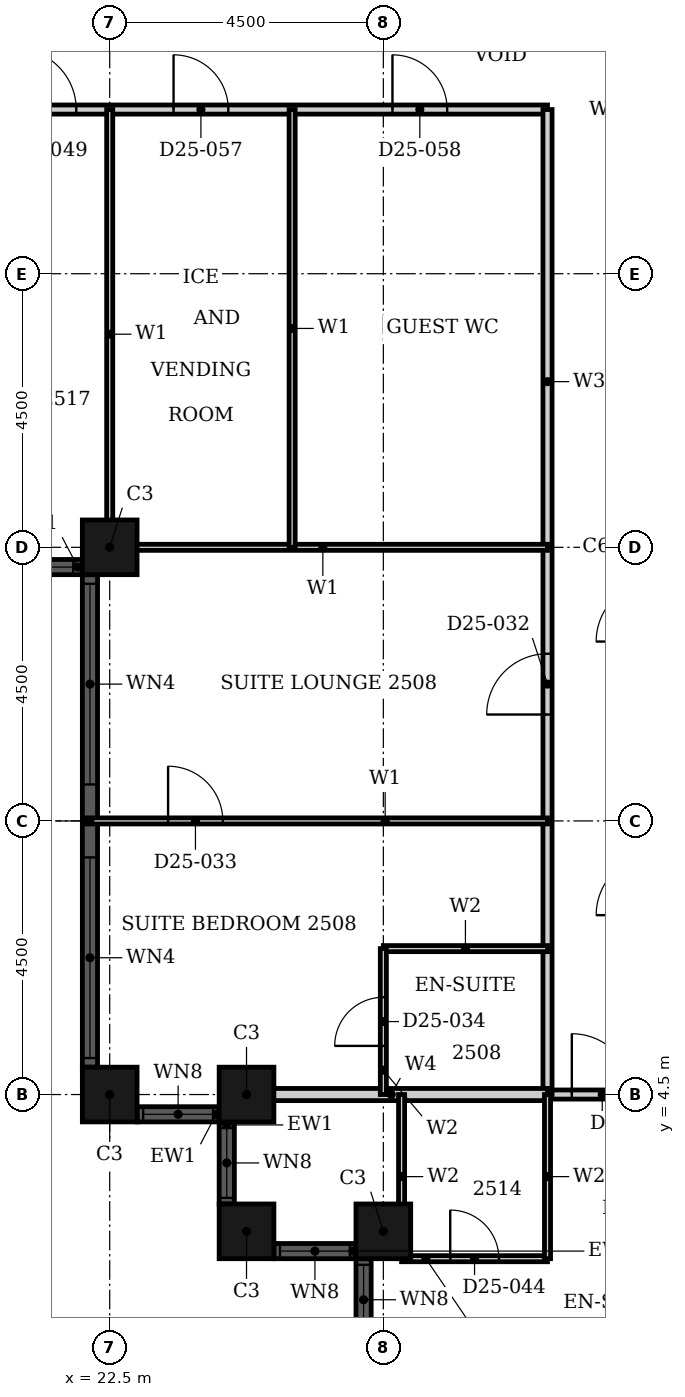
"""IFC4 building model, lengths in metres.
Left out: names, types, materials, properties, quantities, classifications, styles, units other than length and angle.
Written with IfcOpenShell. Run it as: python <this file> out.ifc"""

import sys

from ifc_helpers import new_model, si_unit, direction, frame, frame_2d, origin, origin_2d, place, context, subcontext, project, spatial, rectangle, hollow_rectangle, extrude, element, fill, save


model = new_model("IFC4")
c1 = context("Model", 3, precision=1e-05, world=origin(), true_north=direction((0.0, 1.0)))
c2 = subcontext(c1, "Body", "Model", "MODEL_VIEW")
j1 = project(units=[si_unit("LENGTHUNIT", "METRE"), si_unit("PLANEANGLEUNIT", "RADIAN")], contexts=[c1])
p1 = place(None, origin())
s1 = spatial("IfcSite", under=j1, at=p1, CompositionType="ELEMENT")
p2 = place(p1, origin())
s2 = spatial("IfcBuilding", under=s1, at=p2, CompositionType="ELEMENT")
p3 = place(p2, frame((0.0, 0.0, 104.4)))
s3 = spatial("IfcBuildingStorey", under=s2, at=p3, CompositionType="ELEMENT", Elevation=104.4)
for number, where, z_axis, x_axis in (
    (1, (22.5, 4.5, 0.0), (0.0, 0.0, 1.0), (1.0, 0.0, 0.0)),
    (2, (24.75, 4.5, 0.0), (0.0, 0.0, 1.0), (1.0, 0.0, 0.0)),
    (3, (24.75, 2.25, 0.0), (0.0, 0.0, 1.0), (1.0, 0.0, 0.0)),
    (4, (27.0, 2.25, 0.0), (0.0, 0.0, 1.0), (1.0, 0.0, 0.0)),
    (5, (22.5, 13.5, 0.0), (0.0, 0.0, 1.0), (1.0, 0.0, 0.0)),
):
    element("IfcColumn", number, at=place(p3, frame(where, z_axis=z_axis, x_axis=x_axis)), inside=s3, PredefinedType="COLUMN", context=c2, shape_type="SweptSolid", body=[
        extrude(hollow_rectangle(XDim=0.9, YDim=0.9, WallThickness=0.028, at=origin_2d()), origin(), (0.0, 0.0, 1.0), 3.6),
    ])
p4 = place(p3, frame((22.95, 4.175, 0.0), z_axis=(0.0, 0.0, 1.0), x_axis=(1.0, 0.0, 0.0)))
e6 = element("IfcWall", 6, at=p4, inside=s3, PredefinedType="SOLIDWALL", context=c2, shape_type="SweptSolid", body=[
    extrude(rectangle(XDim=1.35, YDim=0.25, at=frame_2d((0.675, 0.0))), origin(), (0.0, 0.0, 1.0), 3.6),
])
p5 = place(p4, frame((0.1, 0.0, 0.9)))
e7 = element("IfcOpeningElement", 7, at=p5, cuts=e6, PredefinedType="OPENING", context=c2, shape_type="SweptSolid", body=[
    extrude(rectangle(XDim=1.15, YDim=2.08, at=frame_2d((0.575, 1.04))), frame((0.0, 0.135, 0.0), z_axis=(0.0, -1.0, 0.0), x_axis=(1.0, 0.0, 0.0)), (0.0, 0.0, 1.0), 0.27),
])
p6 = place(p3, frame((24.425, 4.05, 0.0), z_axis=(0.0, 0.0, 1.0), x_axis=(0.0, -1.0, 0.0)))
e8 = element("IfcWall", 8, at=p6, inside=s3, PredefinedType="SOLIDWALL", context=c2, shape_type="SweptSolid", body=[
    extrude(rectangle(XDim=1.35, YDim=0.25, at=frame_2d((0.675, 0.0))), origin(), (0.0, 0.0, 1.0), 3.6),
])
p7 = place(p6, frame((0.1, 0.0, 0.9)))
e9 = element("IfcOpeningElement", 9, at=p7, cuts=e8, PredefinedType="OPENING", context=c2, shape_type="SweptSolid", body=[
    extrude(rectangle(XDim=1.15, YDim=2.08, at=frame_2d((0.575, 1.04))), frame((0.0, 0.135, 0.0), z_axis=(0.0, -1.0, 0.0), x_axis=(1.0, 0.0, 0.0)), (0.0, 0.0, 1.0), 0.27),
])
p8 = place(p3, frame((25.2, 1.925, 0.0), z_axis=(0.0, 0.0, 1.0), x_axis=(1.0, 0.0, 0.0)))
e10 = element("IfcWall", 10, at=p8, inside=s3, PredefinedType="SOLIDWALL", context=c2, shape_type="SweptSolid", body=[
    extrude(rectangle(XDim=1.35, YDim=0.25, at=frame_2d((0.675, 0.0))), origin(), (0.0, 0.0, 1.0), 3.6),
])
p9 = place(p8, frame((0.1, 0.0, 0.9)))
e11 = element("IfcOpeningElement", 11, at=p9, cuts=e10, PredefinedType="OPENING", context=c2, shape_type="SweptSolid", body=[
    extrude(rectangle(XDim=1.15, YDim=2.08, at=frame_2d((0.575, 1.04))), frame((0.0, 0.135, 0.0), z_axis=(0.0, -1.0, 0.0), x_axis=(1.0, 0.0, 0.0)), (0.0, 0.0, 1.0), 0.27),
])
p10 = place(p3, frame((26.675, 1.8, 0.0), z_axis=(0.0, 0.0, 1.0), x_axis=(0.0, -1.0, 0.0)))
e12 = element("IfcWall", 12, at=p10, inside=s3, PredefinedType="SOLIDWALL", context=c2, shape_type="SweptSolid", body=[
    extrude(rectangle(XDim=1.35, YDim=0.25, at=frame_2d((0.675, 0.0))), origin(), (0.0, 0.0, 1.0), 3.6),
])
p11 = place(p10, frame((0.1, 0.0, 0.9)))
e13 = element("IfcOpeningElement", 13, at=p11, cuts=e12, PredefinedType="OPENING", context=c2, shape_type="SweptSolid", body=[
    extrude(rectangle(XDim=1.15, YDim=2.08, at=frame_2d((0.575, 1.04))), frame((0.0, 0.135, 0.0), z_axis=(0.0, -1.0, 0.0), x_axis=(1.0, 0.0, 0.0)), (0.0, 0.0, 1.0), 0.27),
])
p12 = place(p3, frame((18.45, 13.175, 0.0), z_axis=(0.0, 0.0, 1.0), x_axis=(1.0, 0.0, 0.0)))
e14 = element("IfcWall", 14, at=p12, inside=s3, PredefinedType="SOLIDWALL", context=c2, shape_type="SweptSolid", body=[
    extrude(rectangle(XDim=3.6, YDim=0.25, at=frame_2d((1.8, 0.0))), origin(), (0.0, 0.0, 1.0), 3.6),
])
p13 = place(p12, frame((0.15, 0.0, 0.9)))
e15 = element("IfcOpeningElement", 15, at=p13, cuts=e14, PredefinedType="OPENING", context=c2, shape_type="SweptSolid", body=[
    extrude(rectangle(XDim=3.3, YDim=2.08, at=frame_2d((1.65, 1.04))), frame((0.0, 0.135, 0.0), z_axis=(0.0, -1.0, 0.0), x_axis=(1.0, 0.0, 0.0)), (0.0, 0.0, 1.0), 0.27),
])
p14 = place(p3, frame((22.175, 13.05, 0.0), z_axis=(0.0, 0.0, 1.0), x_axis=(0.0, -1.0, 0.0)))
e16 = element("IfcWall", 16, at=p14, inside=s3, PredefinedType="SOLIDWALL", context=c2, shape_type="SweptSolid", body=[
    extrude(rectangle(XDim=8.1, YDim=0.25, at=frame_2d((4.05, 0.0))), origin(), (0.0, 0.0, 1.0), 3.6),
])
p15 = place(p14, frame((0.15, 0.0, 0.9)))
e17 = element("IfcOpeningElement", 17, at=p15, cuts=e16, PredefinedType="OPENING", context=c2, shape_type="SweptSolid", body=[
    extrude(rectangle(XDim=3.3, YDim=2.08, at=frame_2d((1.65, 1.04))), frame((0.0, 0.135, 0.0), z_axis=(0.0, -1.0, 0.0), x_axis=(1.0, 0.0, 0.0)), (0.0, 0.0, 1.0), 0.27),
])
p16 = place(p14, frame((4.65, 0.0, 0.9)))
e18 = element("IfcOpeningElement", 18, at=p16, cuts=e16, PredefinedType="OPENING", context=c2, shape_type="SweptSolid", body=[
    extrude(rectangle(XDim=3.3, YDim=2.08, at=frame_2d((1.65, 1.04))), frame((0.0, 0.135, 0.0), z_axis=(0.0, -1.0, 0.0), x_axis=(1.0, 0.0, 0.0)), (0.0, 0.0, 1.0), 0.27),
])
p17 = place(p3, frame((16.2, 20.7, 0.0), z_axis=(0.0, 0.0, 1.0), x_axis=(1.0, 0.0, 0.0)))
e19 = element("IfcWall", 19, at=p17, inside=s3, PredefinedType="PARTITIONING", context=c2, shape_type="SweptSolid", body=[
    extrude(rectangle(XDim=13.5, YDim=0.15, at=frame_2d((6.75, 0.0))), origin(), (0.0, 0.0, 1.0), 3.3),
])
p18 = place(p17, frame((4.75, 0.0, 0.0)))
e20 = element("IfcOpeningElement", 20, at=p18, cuts=e19, PredefinedType="OPENING", context=c2, shape_type="SweptSolid", body=[
    extrude(rectangle(XDim=1.0, YDim=2.1, at=frame_2d((0.5, 1.05))), frame((0.0, 0.085, 0.0), z_axis=(0.0, -1.0, 0.0), x_axis=(1.0, 0.0, 0.0)), (0.0, 0.0, 1.0), 0.17),
])
p19 = place(p17, frame((7.35, 0.0, 0.0)))
e21 = element("IfcOpeningElement", 21, at=p19, cuts=e19, PredefinedType="OPENING", context=c2, shape_type="SweptSolid", body=[
    extrude(rectangle(XDim=0.9, YDim=2.1, at=frame_2d((0.45, 1.05))), frame((0.0, 0.085, 0.0), z_axis=(0.0, -1.0, 0.0), x_axis=(1.0, 0.0, 0.0)), (0.0, 0.0, 1.0), 0.17),
])
p20 = place(p17, frame((10.95, 0.0, 0.0)))
e22 = element("IfcOpeningElement", 22, at=p20, cuts=e19, PredefinedType="OPENING", context=c2, shape_type="SweptSolid", body=[
    extrude(rectangle(XDim=0.9, YDim=2.1, at=frame_2d((0.45, 1.05))), frame((0.0, 0.085, 0.0), z_axis=(0.0, -1.0, 0.0), x_axis=(1.0, 0.0, 0.0)), (0.0, 0.0, 1.0), 0.17),
])
p21 = place(p3, frame((29.7, 4.5, 0.0), z_axis=(0.0, 0.0, 1.0), x_axis=(1.0, 0.0, 0.0)))
e23 = element("IfcWall", 23, at=p21, inside=s3, PredefinedType="PARTITIONING", context=c2, shape_type="SweptSolid", body=[
    extrude(rectangle(XDim=1.8, YDim=0.15, at=frame_2d((0.9, 0.0))), origin(), (0.0, 0.0, 1.0), 3.3),
])
p22 = place(p21, frame((0.4, 0.0, 0.0)))
e24 = element("IfcOpeningElement", 24, at=p22, cuts=e23, PredefinedType="OPENING", context=c2, shape_type="SweptSolid", body=[
    extrude(rectangle(XDim=1.0, YDim=2.1, at=frame_2d((0.5, 1.05))), frame((0.0, 0.085, 0.0), z_axis=(0.0, -1.0, 0.0), x_axis=(1.0, 0.0, 0.0)), (0.0, 0.0, 1.0), 0.17),
])
p23 = place(p3, frame((29.7, 4.5, 0.0), z_axis=(0.0, 0.0, 1.0), x_axis=(0.0, 1.0, 0.0)))
e25 = element("IfcWall", 25, at=p23, inside=s3, PredefinedType="PARTITIONING", context=c2, shape_type="SweptSolid", body=[
    extrude(rectangle(XDim=16.2, YDim=0.15, at=frame_2d((8.1, 0.0))), origin(), (0.0, 0.0, 1.0), 3.3),
])
p24 = place(p23, frame((6.25, 0.0, 0.0)))
e26 = element("IfcOpeningElement", 26, at=p24, cuts=e25, PredefinedType="OPENING", context=c2, shape_type="SweptSolid", body=[
    extrude(rectangle(XDim=1.0, YDim=2.1, at=frame_2d((0.5, 1.05))), frame((0.0, 0.085, 0.0), z_axis=(0.0, -1.0, 0.0), x_axis=(1.0, 0.0, 0.0)), (0.0, 0.0, 1.0), 0.17),
])
p25 = place(p3, frame((22.31, 13.5, 0.0), z_axis=(0.0, 0.0, 1.0), x_axis=(1.0, 0.0, 0.0)))
e27 = element("IfcWall", 27, at=p25, inside=s3, PredefinedType="PARTITIONING", context=c2, shape_type="SweptSolid", body=[
    extrude(rectangle(XDim=7.39, YDim=0.1, at=frame_2d((3.695, 0.0))), origin(), (0.0, 0.0, 1.0), 2.38),
])
p26 = place(p3, frame((22.11, 9.0, 0.0), z_axis=(0.0, 0.0, 1.0), x_axis=(1.0, 0.0, 0.0)))
e28 = element("IfcWall", 28, at=p26, inside=s3, PredefinedType="PARTITIONING", context=c2, shape_type="SweptSolid", body=[
    extrude(rectangle(XDim=7.59, YDim=0.1, at=frame_2d((3.795, 0.0))), origin(), (0.0, 0.0, 1.0), 3.3),
])
p27 = place(p26, frame((1.35, 0.0, 0.0)))
e29 = element("IfcOpeningElement", 29, at=p27, cuts=e28, PredefinedType="OPENING", context=c2, shape_type="SweptSolid", body=[
    extrude(rectangle(XDim=0.9, YDim=2.1, at=frame_2d((0.45, 1.05))), frame((0.0, 0.06, 0.0), z_axis=(0.0, -1.0, 0.0), x_axis=(1.0, 0.0, 0.0)), (0.0, 0.0, 1.0), 0.12),
])
p28 = place(p3, frame((22.5, 13.31, 0.0), z_axis=(0.0, 0.0, 1.0), x_axis=(0.0, 1.0, 0.0)))
e30 = element("IfcWall", 30, at=p28, inside=s3, PredefinedType="PARTITIONING", context=c2, shape_type="SweptSolid", body=[
    extrude(rectangle(XDim=7.39, YDim=0.1, at=frame_2d((3.695, 0.0))), origin(), (0.0, 0.0, 1.0), 3.3),
])
p29 = place(p3, frame((25.5, 13.5, 0.0), z_axis=(0.0, 0.0, 1.0), x_axis=(0.0, 1.0, 0.0)))
e31 = element("IfcWall", 31, at=p29, inside=s3, PredefinedType="PARTITIONING", context=c2, shape_type="SweptSolid", body=[
    extrude(rectangle(XDim=7.2, YDim=0.1, at=frame_2d((3.6, 0.0))), origin(), (0.0, 0.0, 1.0), 3.3),
])
p30 = place(p3, frame((24.56, 4.5, 0.0), z_axis=(0.0, 0.0, 1.0), x_axis=(1.0, 0.0, 0.0)))
e32 = element("IfcWall", 32, at=p30, inside=s3, PredefinedType="PARTITIONING", context=c2, shape_type="SweptSolid", body=[
    extrude(rectangle(XDim=5.14, YDim=0.2, at=frame_2d((2.57, 0.0))), origin(), (0.0, 0.0, 1.0), 3.3),
])
p31 = place(p3, frame((27.3, 1.8, 0.0), z_axis=(0.0, 0.0, 1.0), x_axis=(1.0, 0.0, 0.0)))
e33 = element("IfcWall", 33, at=p31, inside=s3, PredefinedType="PARTITIONING", context=c2, shape_type="SweptSolid", body=[
    extrude(rectangle(XDim=2.4, YDim=0.1, at=frame_2d((1.2, 0.0))), origin(), (0.0, 0.0, 1.0), 3.3),
])
p32 = place(p31, frame((0.8, 0.0, 0.0)))
e34 = element("IfcOpeningElement", 34, at=p32, cuts=e33, PredefinedType="OPENING", context=c2, shape_type="SweptSolid", body=[
    extrude(rectangle(XDim=0.8, YDim=2.1, at=frame_2d((0.4, 1.05))), frame((0.0, 0.06, 0.0), z_axis=(0.0, -1.0, 0.0), x_axis=(1.0, 0.0, 0.0)), (0.0, 0.0, 1.0), 0.12),
])
p33 = place(p3, frame((27.0, 6.9, 0.0), z_axis=(0.0, 0.0, 1.0), x_axis=(1.0, 0.0, 0.0)))
e35 = element("IfcWall", 35, at=p33, inside=s3, PredefinedType="PARTITIONING", context=c2, shape_type="SweptSolid", body=[
    extrude(rectangle(XDim=2.7, YDim=0.1, at=frame_2d((1.35, 0.0))), origin(), (0.0, 0.0, 1.0), 3.3),
])
p34 = place(p3, frame((27.0, 4.5, 0.0), z_axis=(0.0, 0.0, 1.0), x_axis=(0.0, 1.0, 0.0)))
e36 = element("IfcWall", 36, at=p34, inside=s3, PredefinedType="PARTITIONING", context=c2, shape_type="SweptSolid", body=[
    extrude(rectangle(XDim=2.4, YDim=0.1, at=frame_2d((1.2, 0.0))), origin(), (0.0, 0.0, 1.0), 2.58),
])
p35 = place(p34, frame((0.8, 0.0, 0.0)))
e37 = element("IfcOpeningElement", 37, at=p35, cuts=e36, PredefinedType="OPENING", context=c2, shape_type="SweptSolid", body=[
    extrude(rectangle(XDim=0.8, YDim=2.1, at=frame_2d((0.4, 1.05))), frame((0.0, 0.06, 0.0), z_axis=(0.0, -1.0, 0.0), x_axis=(1.0, 0.0, 0.0)), (0.0, 0.0, 1.0), 0.12),
])
for number, where, z_axis, x_axis in (
    (38, (27.3, 1.8, 0.0), (0.0, 0.0, 1.0), (0.0, 1.0, 0.0)),
    (39, (29.7, 1.8, 0.0), (0.0, 0.0, 1.0), (0.0, 1.0, 0.0)),
):
    element("IfcWall", number, at=place(p3, frame(where, z_axis=z_axis, x_axis=x_axis)), inside=s3, PredefinedType="PARTITIONING", context=c2, shape_type="SweptSolid", body=[
        extrude(rectangle(XDim=2.7, YDim=0.1, at=frame_2d((1.35, 0.0))), origin(), (0.0, 0.0, 1.0), 3.3),
    ])
p36 = place(p5, origin())
e40 = element("IfcWindow", 40, at=p36, inside=s3, PartitioningType="SINGLE_PANEL", PredefinedType="WINDOW", context=c2, shape_type="SweptSolid", body=[
    extrude(rectangle(XDim=1.15, YDim=2.08, at=frame_2d((0.575, 1.04))), frame((0.0, 0.03, 0.0), z_axis=(0.0, -1.0, 0.0), x_axis=(1.0, 0.0, 0.0)), (0.0, 0.0, 1.0), 0.06),
])
fill(e7, e40)
p37 = place(p7, origin())
e41 = element("IfcWindow", 41, at=p37, inside=s3, PartitioningType="SINGLE_PANEL", PredefinedType="WINDOW", context=c2, shape_type="SweptSolid", body=[
    extrude(rectangle(XDim=1.15, YDim=2.08, at=frame_2d((0.575, 1.04))), frame((0.0, 0.03, 0.0), z_axis=(0.0, -1.0, 0.0), x_axis=(1.0, 0.0, 0.0)), (0.0, 0.0, 1.0), 0.06),
])
fill(e9, e41)
p38 = place(p9, origin())
e42 = element("IfcWindow", 42, at=p38, inside=s3, PartitioningType="SINGLE_PANEL", PredefinedType="WINDOW", context=c2, shape_type="SweptSolid", body=[
    extrude(rectangle(XDim=1.15, YDim=2.08, at=frame_2d((0.575, 1.04))), frame((0.0, 0.03, 0.0), z_axis=(0.0, -1.0, 0.0), x_axis=(1.0, 0.0, 0.0)), (0.0, 0.0, 1.0), 0.06),
])
fill(e11, e42)
p39 = place(p11, origin())
e43 = element("IfcWindow", 43, at=p39, inside=s3, PartitioningType="SINGLE_PANEL", PredefinedType="WINDOW", context=c2, shape_type="SweptSolid", body=[
    extrude(rectangle(XDim=1.15, YDim=2.08, at=frame_2d((0.575, 1.04))), frame((0.0, 0.03, 0.0), z_axis=(0.0, -1.0, 0.0), x_axis=(1.0, 0.0, 0.0)), (0.0, 0.0, 1.0), 0.06),
])
fill(e13, e43)
p40 = place(p13, origin())
e44 = element("IfcWindow", 44, at=p40, inside=s3, PartitioningType="SINGLE_PANEL", PredefinedType="WINDOW", context=c2, shape_type="SweptSolid", body=[
    extrude(rectangle(XDim=3.3, YDim=2.08, at=frame_2d((1.65, 1.04))), frame((0.0, 0.03, 0.0), z_axis=(0.0, -1.0, 0.0), x_axis=(1.0, 0.0, 0.0)), (0.0, 0.0, 1.0), 0.06),
])
fill(e15, e44)
p41 = place(p15, origin())
e45 = element("IfcWindow", 45, at=p41, inside=s3, PartitioningType="SINGLE_PANEL", PredefinedType="WINDOW", context=c2, shape_type="SweptSolid", body=[
    extrude(rectangle(XDim=3.3, YDim=2.08, at=frame_2d((1.65, 1.04))), frame((0.0, 0.03, 0.0), z_axis=(0.0, -1.0, 0.0), x_axis=(1.0, 0.0, 0.0)), (0.0, 0.0, 1.0), 0.06),
])
fill(e17, e45)
p42 = place(p16, origin())
e46 = element("IfcWindow", 46, at=p42, inside=s3, PartitioningType="SINGLE_PANEL", PredefinedType="WINDOW", context=c2, shape_type="SweptSolid", body=[
    extrude(rectangle(XDim=3.3, YDim=2.08, at=frame_2d((1.65, 1.04))), frame((0.0, 0.03, 0.0), z_axis=(0.0, -1.0, 0.0), x_axis=(1.0, 0.0, 0.0)), (0.0, 0.0, 1.0), 0.06),
])
fill(e18, e46)
p43 = place(p24, origin())
e47 = element("IfcDoor", 47, at=p43, inside=s3, OperationType="SINGLE_SWING_LEFT", PredefinedType="DOOR", context=c2, shape_type="SweptSolid", body=[
    extrude(rectangle(XDim=1.0, YDim=2.1, at=frame_2d((0.5, 1.05))), frame((0.0, 0.025, 0.0), z_axis=(0.0, -1.0, 0.0), x_axis=(1.0, 0.0, 0.0)), (0.0, 0.0, 1.0), 0.05),
])
fill(e26, e47)
p44 = place(p27, origin())
e48 = element("IfcDoor", 48, at=p44, inside=s3, OperationType="SINGLE_SWING_LEFT", PredefinedType="DOOR", context=c2, shape_type="SweptSolid", body=[
    extrude(rectangle(XDim=0.9, YDim=2.1, at=frame_2d((0.45, 1.05))), frame((0.0, 0.025, 0.0), z_axis=(0.0, -1.0, 0.0), x_axis=(1.0, 0.0, 0.0)), (0.0, 0.0, 1.0), 0.05),
])
fill(e29, e48)
p45 = place(p35, origin())
e49 = element("IfcDoor", 49, at=p45, inside=s3, OperationType="SINGLE_SWING_RIGHT", PredefinedType="DOOR", context=c2, shape_type="SweptSolid", body=[
    extrude(rectangle(XDim=0.8, YDim=2.1, at=frame_2d((0.4, 1.05))), frame((0.0, 0.025, 0.0), z_axis=(0.0, -1.0, 0.0), x_axis=(1.0, 0.0, 0.0)), (0.0, 0.0, 1.0), 0.05),
])
fill(e37, e49)
p46 = place(p22, origin())
e50 = element("IfcDoor", 50, at=p46, inside=s3, OperationType="SINGLE_SWING_LEFT", PredefinedType="DOOR", context=c2, shape_type="SweptSolid", body=[
    extrude(rectangle(XDim=1.0, YDim=2.1, at=frame_2d((0.5, 1.05))), frame((0.0, 0.025, 0.0), z_axis=(0.0, -1.0, 0.0), x_axis=(1.0, 0.0, 0.0)), (0.0, 0.0, 1.0), 0.05),
])
fill(e24, e50)
p47 = place(p32, origin())
e51 = element("IfcDoor", 51, at=p47, inside=s3, OperationType="SINGLE_SWING_LEFT", PredefinedType="DOOR", context=c2, shape_type="SweptSolid", body=[
    extrude(rectangle(XDim=0.8, YDim=2.1, at=frame_2d((0.4, 1.05))), frame((0.0, 0.025, 0.0), z_axis=(0.0, -1.0, 0.0), x_axis=(1.0, 0.0, 0.0)), (0.0, 0.0, 1.0), 0.05),
])
fill(e34, e51)
p48 = place(p18, origin())
e52 = element("IfcDoor", 52, at=p48, inside=s3, OperationType="SINGLE_SWING_RIGHT", PredefinedType="DOOR", context=c2, shape_type="SweptSolid", body=[
    extrude(rectangle(XDim=1.0, YDim=2.1, at=frame_2d((0.5, 1.05))), frame((0.0, 0.025, 0.0), z_axis=(0.0, -1.0, 0.0), x_axis=(1.0, 0.0, 0.0)), (0.0, 0.0, 1.0), 0.05),
])
fill(e20, e52)
p49 = place(p19, origin())
e53 = element("IfcDoor", 53, at=p49, inside=s3, OperationType="SINGLE_SWING_RIGHT", PredefinedType="DOOR", context=c2, shape_type="SweptSolid", body=[
    extrude(rectangle(XDim=0.9, YDim=2.1, at=frame_2d((0.45, 1.05))), frame((0.0, 0.025, 0.0), z_axis=(0.0, -1.0, 0.0), x_axis=(1.0, 0.0, 0.0)), (0.0, 0.0, 1.0), 0.05),
])
fill(e21, e53)
p50 = place(p20, origin())
e54 = element("IfcDoor", 54, at=p50, inside=s3, OperationType="SINGLE_SWING_RIGHT", PredefinedType="DOOR", context=c2, shape_type="SweptSolid", body=[
    extrude(rectangle(XDim=0.9, YDim=2.1, at=frame_2d((0.45, 1.05))), frame((0.0, 0.025, 0.0), z_axis=(0.0, -1.0, 0.0), x_axis=(1.0, 0.0, 0.0)), (0.0, 0.0, 1.0), 0.05),
])
fill(e22, e54)
save(model, sys.argv[1])
